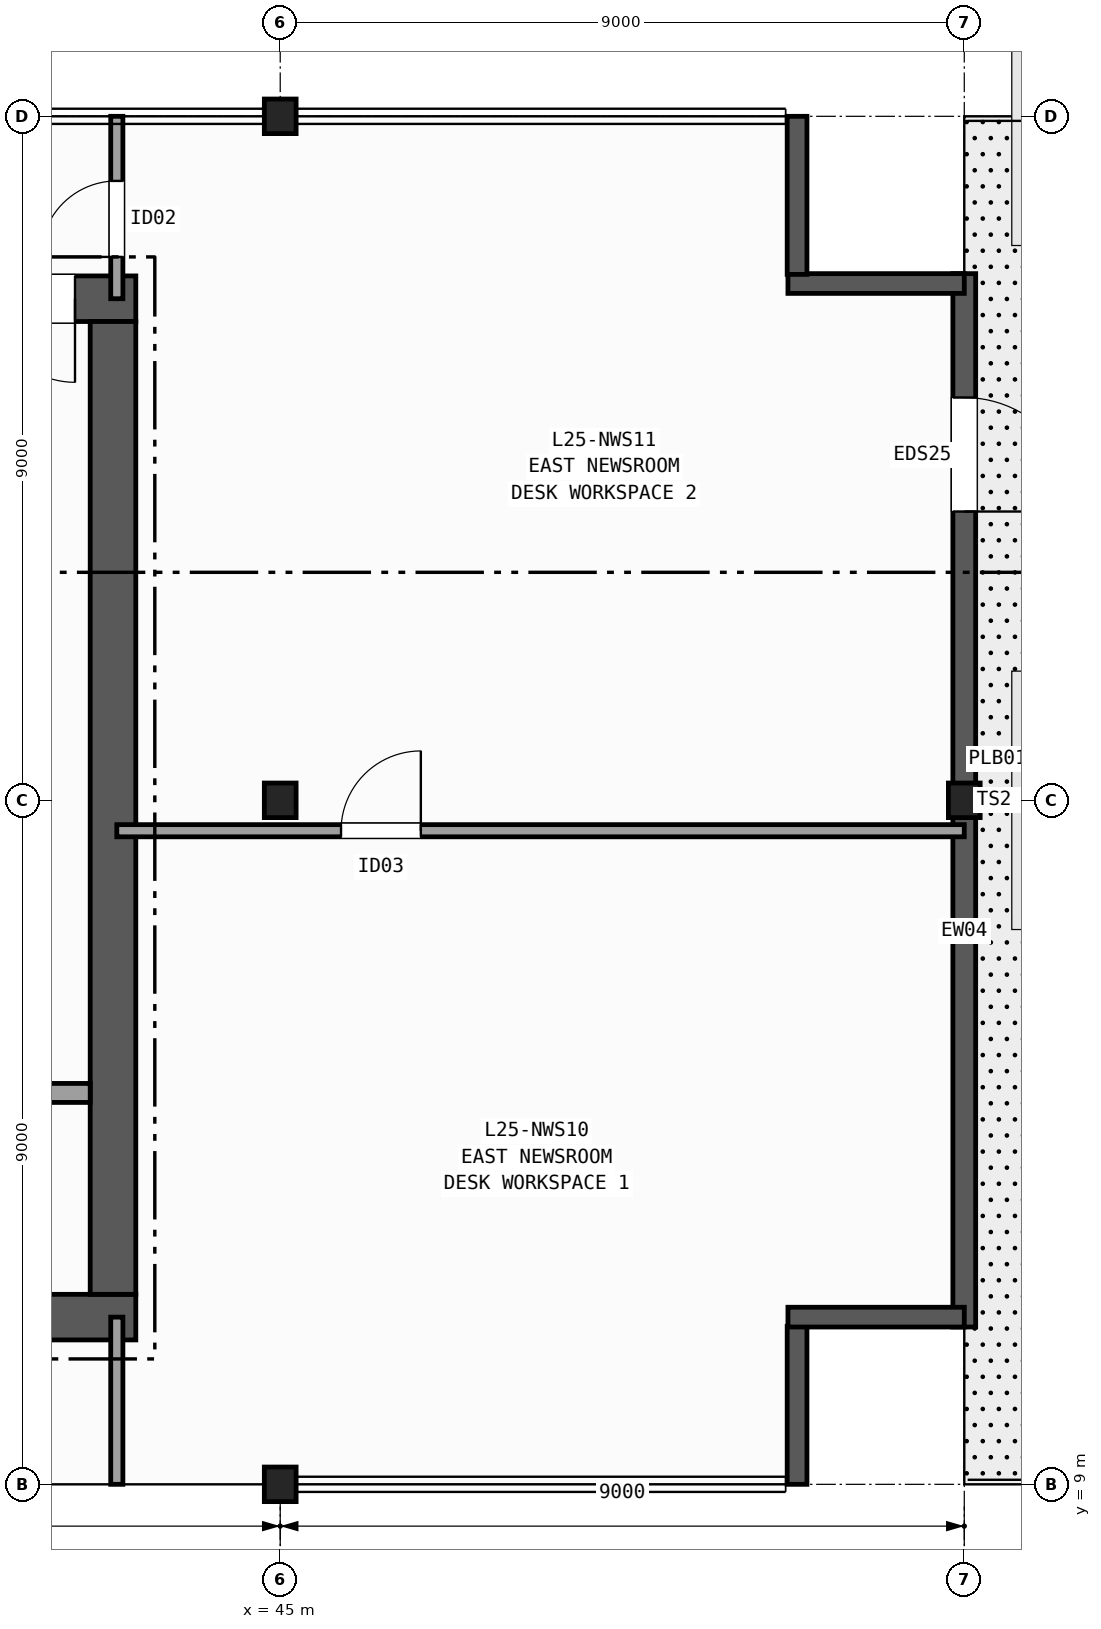
"""IFC4 building model, lengths in metres.
Left out: names, types, materials, properties, quantities, classifications, styles, units other than length and angle.
Written with IfcOpenShell. Run it as: python <this file> out.ifc"""

import sys

from ifc_helpers import new_model, si_unit, direction, frame, frame_2d, origin, origin_2d, place, context, subcontext, project, spatial, rectangle, i_section, extrude, element, fill, save


model = new_model("IFC4")
c1 = context("Model", 3, precision=1e-05, world=origin(), true_north=direction((0.0, 1.0)))
c2 = subcontext(c1, "Body", "Model", "MODEL_VIEW")
j1 = project(units=[si_unit("LENGTHUNIT", "METRE"), si_unit("PLANEANGLEUNIT", "RADIAN")], contexts=[c1])
p1 = place(None, origin())
s1 = spatial("IfcSite", under=j1, at=p1, CompositionType="ELEMENT")
p2 = place(p1, origin())
s2 = spatial("IfcBuilding", under=s1, at=p2, CompositionType="ELEMENT")
p3 = place(p2, frame((0.0, 0.0, 105.0)))
s3 = spatial("IfcBuildingStorey", under=s2, at=p3, CompositionType="ELEMENT", Elevation=105.0)
for number, where, z_axis, x_axis in (
    (1, (45.0, 9.0, 0.0), (0.0, 0.0, 1.0), (1.0, 0.0, 0.0)),
    (2, (45.0, 18.0, 0.0), (0.0, 0.0, 1.0), (1.0, 0.0, 0.0)),
    (3, (45.0, 27.0, 0.0), (0.0, 0.0, 1.0), (1.0, 0.0, 0.0)),
    (4, (54.0, 18.0, 0.0), (0.0, 0.0, 1.0), (1.0, 0.0, 0.0)),
):
    element("IfcColumn", number, at=place(p3, frame(where, z_axis=z_axis, x_axis=x_axis)), inside=s3, PredefinedType="COLUMN", context=c2, shape_type="SweptSolid", body=[
        extrude(i_section(OverallWidth=0.418, OverallDepth=0.455, WebThickness=0.042, FlangeThickness=0.068, FilletRadius=0.015, at=origin_2d()), origin(), (0.0, 0.0, 1.0), 5.0),
    ])
p4 = place(p3, frame((54.0, 24.93, 0.0), z_axis=(0.0, 0.0, 1.0), x_axis=(0.0, -1.0, 0.0)))
e5 = element("IfcWall", 5, at=p4, inside=s3, PredefinedType="SOLIDWALL", context=c2, shape_type="SweptSolid", body=[
    extrude(rectangle(XDim=13.86, YDim=0.3, at=frame_2d((6.93, 0.0))), origin(), (0.0, 0.0, 1.0), 4.72),
])
p5 = place(p4, frame((1.63, 0.0, 0.0)))
e6 = element("IfcOpeningElement", 6, at=p5, cuts=e5, PredefinedType="OPENING", context=c2, shape_type="SweptSolid", body=[
    extrude(rectangle(XDim=1.5, YDim=2.3, at=frame_2d((0.75, 1.15))), frame((0.0, 0.16, 0.0), z_axis=(0.0, -1.0, 0.0), x_axis=(1.0, 0.0, 0.0)), (0.0, 0.0, 1.0), 0.32),
])
p6 = place(p3, frame((51.8, 9.0, 0.0), z_axis=(0.0, 0.0, 1.0), x_axis=(0.0, 1.0, 0.0)))
e7 = element("IfcWall", 7, at=p6, inside=s3, PredefinedType="SOLIDWALL", context=c2, shape_type="SweptSolid", body=[
    extrude(rectangle(XDim=2.08, YDim=0.26, at=frame_2d((1.04, 0.0))), origin(), (0.0, 0.0, 1.0), 4.72),
])
for number, where, z_axis, x_axis in (
    (8, (51.68, 11.2, 0.0), (0.0, 0.0, 1.0), (1.0, 0.0, 0.0)),
    (9, (54.0, 24.8, 0.0), (0.0, 0.0, 1.0), (-1.0, 0.0, 0.0)),
):
    element("IfcWall", number, at=place(p3, frame(where, z_axis=z_axis, x_axis=x_axis)), inside=s3, PredefinedType="SOLIDWALL", context=c2, shape_type="SweptSolid", body=[
        extrude(rectangle(XDim=2.32, YDim=0.26, at=frame_2d((1.16, 0.0))), origin(), (0.0, 0.0, 1.0), 4.72),
    ])
p7 = place(p3, frame((51.8, 24.92, 0.0), z_axis=(0.0, 0.0, 1.0), x_axis=(0.0, 1.0, 0.0)))
e10 = element("IfcWall", 10, at=p7, inside=s3, PredefinedType="SOLIDWALL", context=c2, shape_type="SweptSolid", body=[
    extrude(rectangle(XDim=2.08, YDim=0.26, at=frame_2d((1.04, 0.0))), origin(), (0.0, 0.0, 1.0), 4.72),
])
p8 = place(p3, frame((29.1, 11.2, 0.0), z_axis=(0.0, 0.0, 1.0), x_axis=(1.0, 0.0, 0.0)))
e11 = element("IfcWall", 11, at=p8, inside=s3, PredefinedType="SHEAR", context=c2, shape_type="SweptSolid", body=[
    extrude(rectangle(XDim=14.0, YDim=0.6, at=frame_2d((7.0, 0.0))), origin(), (0.0, 0.0, 1.0), 4.72),
])
p9 = place(p3, frame((43.1, 24.6, 0.0), z_axis=(0.0, 0.0, 1.0), x_axis=(-1.0, 0.0, 0.0)))
e12 = element("IfcWall", 12, at=p9, inside=s3, PredefinedType="SHEAR", context=c2, shape_type="SweptSolid", body=[
    extrude(rectangle(XDim=14.0, YDim=0.6, at=frame_2d((7.0, 0.0))), origin(), (0.0, 0.0, 1.0), 4.72),
])
p10 = place(p9, frame((0.8, 0.0, 0.0)))
e13 = element("IfcOpeningElement", 13, at=p10, cuts=e12, PredefinedType="OPENING", context=c2, shape_type="SweptSolid", body=[
    extrude(rectangle(XDim=1.1, YDim=2.15, at=frame_2d((0.55, 1.075))), frame((0.0, 0.31, 0.0), z_axis=(0.0, -1.0, 0.0), x_axis=(1.0, 0.0, 0.0)), (0.0, 0.0, 1.0), 0.62),
])
p11 = place(p9, frame((2.3, 0.0, 0.0)))
e14 = element("IfcOpeningElement", 14, at=p11, cuts=e12, PredefinedType="OPENING", context=c2, shape_type="SweptSolid", body=[
    extrude(rectangle(XDim=0.9, YDim=2.1, at=frame_2d((0.45, 1.05))), frame((0.0, 0.31, 0.0), z_axis=(0.0, -1.0, 0.0), x_axis=(1.0, 0.0, 0.0)), (0.0, 0.0, 1.0), 0.62),
])
p12 = place(p9, frame((3.6, 0.0, 0.0)))
e15 = element("IfcOpeningElement", 15, at=p12, cuts=e12, PredefinedType="OPENING", context=c2, shape_type="SweptSolid", body=[
    extrude(rectangle(XDim=0.9, YDim=2.1, at=frame_2d((0.45, 1.05))), frame((0.0, 0.31, 0.0), z_axis=(0.0, -1.0, 0.0), x_axis=(1.0, 0.0, 0.0)), (0.0, 0.0, 1.0), 0.62),
])
p13 = place(p9, frame((4.95, 0.0, 0.0)))
e16 = element("IfcOpeningElement", 16, at=p13, cuts=e12, PredefinedType="OPENING", context=c2, shape_type="SweptSolid", body=[
    extrude(rectangle(XDim=0.9, YDim=2.1, at=frame_2d((0.45, 1.05))), frame((0.0, 0.31, 0.0), z_axis=(0.0, -1.0, 0.0), x_axis=(1.0, 0.0, 0.0)), (0.0, 0.0, 1.0), 0.62),
])
p14 = place(p3, frame((42.8, 11.5, 0.0), z_axis=(0.0, 0.0, 1.0), x_axis=(0.0, 1.0, 0.0)))
e17 = element("IfcWall", 17, at=p14, inside=s3, PredefinedType="SHEAR", context=c2, shape_type="SweptSolid", body=[
    extrude(rectangle(XDim=12.8, YDim=0.6, at=frame_2d((6.4, 0.0))), origin(), (0.0, 0.0, 1.0), 4.72),
])
p15 = place(p3, frame((33.07, 14.15, 0.0), z_axis=(0.0, 0.0, 1.0), x_axis=(1.0, 0.0, 0.0)))
e18 = element("IfcWall", 18, at=p15, inside=s3, PredefinedType="PARTITIONING", context=c2, shape_type="SweptSolid", body=[
    extrude(rectangle(XDim=9.43, YDim=0.25, at=frame_2d((4.715, 0.0))), origin(), (0.0, 0.0, 1.0), 4.72),
])
p16 = place(p15, frame((0.755, 0.0, 0.0)))
e19 = element("IfcOpeningElement", 19, at=p16, cuts=e18, PredefinedType="OPENING", context=c2, shape_type="SweptSolid", body=[
    extrude(rectangle(XDim=1.15, YDim=2.15, at=frame_2d((0.575, 1.075))), frame((0.0, 0.135, 0.0), z_axis=(0.0, -1.0, 0.0), x_axis=(1.0, 0.0, 0.0)), (0.0, 0.0, 1.0), 0.27),
])
p17 = place(p15, frame((3.355, 0.0, 0.0)))
e20 = element("IfcOpeningElement", 20, at=p17, cuts=e18, PredefinedType="OPENING", context=c2, shape_type="SweptSolid", body=[
    extrude(rectangle(XDim=1.15, YDim=2.15, at=frame_2d((0.575, 1.075))), frame((0.0, 0.135, 0.0), z_axis=(0.0, -1.0, 0.0), x_axis=(1.0, 0.0, 0.0)), (0.0, 0.0, 1.0), 0.27),
])
p18 = place(p15, frame((6.055, 0.0, 0.0)))
e21 = element("IfcOpeningElement", 21, at=p18, cuts=e18, PredefinedType="OPENING", context=c2, shape_type="SweptSolid", body=[
    extrude(rectangle(XDim=1.15, YDim=2.15, at=frame_2d((0.575, 1.075))), frame((0.0, 0.135, 0.0), z_axis=(0.0, -1.0, 0.0), x_axis=(1.0, 0.0, 0.0)), (0.0, 0.0, 1.0), 0.27),
])
p19 = place(p3, frame((42.85, 9.0, 0.0), z_axis=(0.0, 0.0, 1.0), x_axis=(0.0, 1.0, 0.0)))
e22 = element("IfcWall", 22, at=p19, inside=s3, PredefinedType="PARTITIONING", context=c2, shape_type="SweptSolid", body=[
    extrude(rectangle(XDim=2.2, YDim=0.16, at=frame_2d((1.1, 0.0))), origin(), (0.0, 0.0, 1.0), 3.934),
])
p20 = place(p3, frame((42.85, 24.6, 0.0), z_axis=(0.0, 0.0, 1.0), x_axis=(0.0, 1.0, 0.0)))
e23 = element("IfcWall", 23, at=p20, inside=s3, PredefinedType="PARTITIONING", context=c2, shape_type="SweptSolid", body=[
    extrude(rectangle(XDim=2.4, YDim=0.16, at=frame_2d((1.2, 0.0))), origin(), (0.0, 0.0, 1.0), 3.934),
])
p21 = place(p20, frame((0.55, 0.0, 0.0)))
e24 = element("IfcOpeningElement", 24, at=p21, cuts=e23, PredefinedType="OPENING", context=c2, shape_type="SweptSolid", body=[
    extrude(rectangle(XDim=1.0, YDim=2.1, at=frame_2d((0.5, 1.05))), frame((0.0, 0.09, 0.0), z_axis=(0.0, -1.0, 0.0), x_axis=(1.0, 0.0, 0.0)), (0.0, 0.0, 1.0), 0.18),
])
p22 = place(p3, frame((42.85, 17.6, 0.0), z_axis=(0.0, 0.0, 1.0), x_axis=(1.0, 0.0, 0.0)))
e25 = element("IfcWall", 25, at=p22, inside=s3, PredefinedType="PARTITIONING", context=c2, shape_type="SweptSolid", body=[
    extrude(rectangle(XDim=11.15, YDim=0.16, at=frame_2d((5.575, 0.0))), origin(), (0.0, 0.0, 1.0), 4.092),
])
p23 = place(p22, frame((2.95, 0.0, 0.0)))
e26 = element("IfcOpeningElement", 26, at=p23, cuts=e25, PredefinedType="OPENING", context=c2, shape_type="SweptSolid", body=[
    extrude(rectangle(XDim=1.05, YDim=2.15, at=frame_2d((0.525, 1.075))), frame((0.0, 0.09, 0.0), z_axis=(0.0, -1.0, 0.0), x_axis=(1.0, 0.0, 0.0)), (0.0, 0.0, 1.0), 0.18),
])
p24 = place(p5, origin())
e27 = element("IfcDoor", 27, at=p24, inside=s3, OperationType="SINGLE_SWING_RIGHT", PredefinedType="DOOR", context=c2, shape_type="SweptSolid", body=[
    extrude(rectangle(XDim=1.5, YDim=2.3, at=frame_2d((0.75, 1.15))), frame((0.0, 0.025, 0.0), z_axis=(0.0, -1.0, 0.0), x_axis=(1.0, 0.0, 0.0)), (0.0, 0.0, 1.0), 0.05),
])
fill(e6, e27)
p25 = place(p10, origin())
e28 = element("IfcDoor", 28, at=p25, inside=s3, OperationType="SINGLE_SWING_LEFT", PredefinedType="DOOR", context=c2, shape_type="SweptSolid", body=[
    extrude(rectangle(XDim=1.1, YDim=2.15, at=frame_2d((0.55, 1.075))), frame((0.0, 0.025, 0.0), z_axis=(0.0, -1.0, 0.0), x_axis=(1.0, 0.0, 0.0)), (0.0, 0.0, 1.0), 0.05),
])
fill(e13, e28)
p26 = place(p21, origin())
e29 = element("IfcDoor", 29, at=p26, inside=s3, OperationType="SINGLE_SWING_LEFT", PredefinedType="DOOR", context=c2, shape_type="SweptSolid", body=[
    extrude(rectangle(XDim=1.0, YDim=2.1, at=frame_2d((0.5, 1.05))), frame((0.0, 0.025, 0.0), z_axis=(0.0, -1.0, 0.0), x_axis=(1.0, 0.0, 0.0)), (0.0, 0.0, 1.0), 0.05),
])
fill(e24, e29)
p27 = place(p23, origin())
e30 = element("IfcDoor", 30, at=p27, inside=s3, OperationType="SINGLE_SWING_RIGHT", PredefinedType="DOOR", context=c2, shape_type="SweptSolid", body=[
    extrude(rectangle(XDim=1.05, YDim=2.15, at=frame_2d((0.525, 1.075))), frame((0.0, 0.025, 0.0), z_axis=(0.0, -1.0, 0.0), x_axis=(1.0, 0.0, 0.0)), (0.0, 0.0, 1.0), 0.05),
])
fill(e26, e30)
save(model, sys.argv[1])
